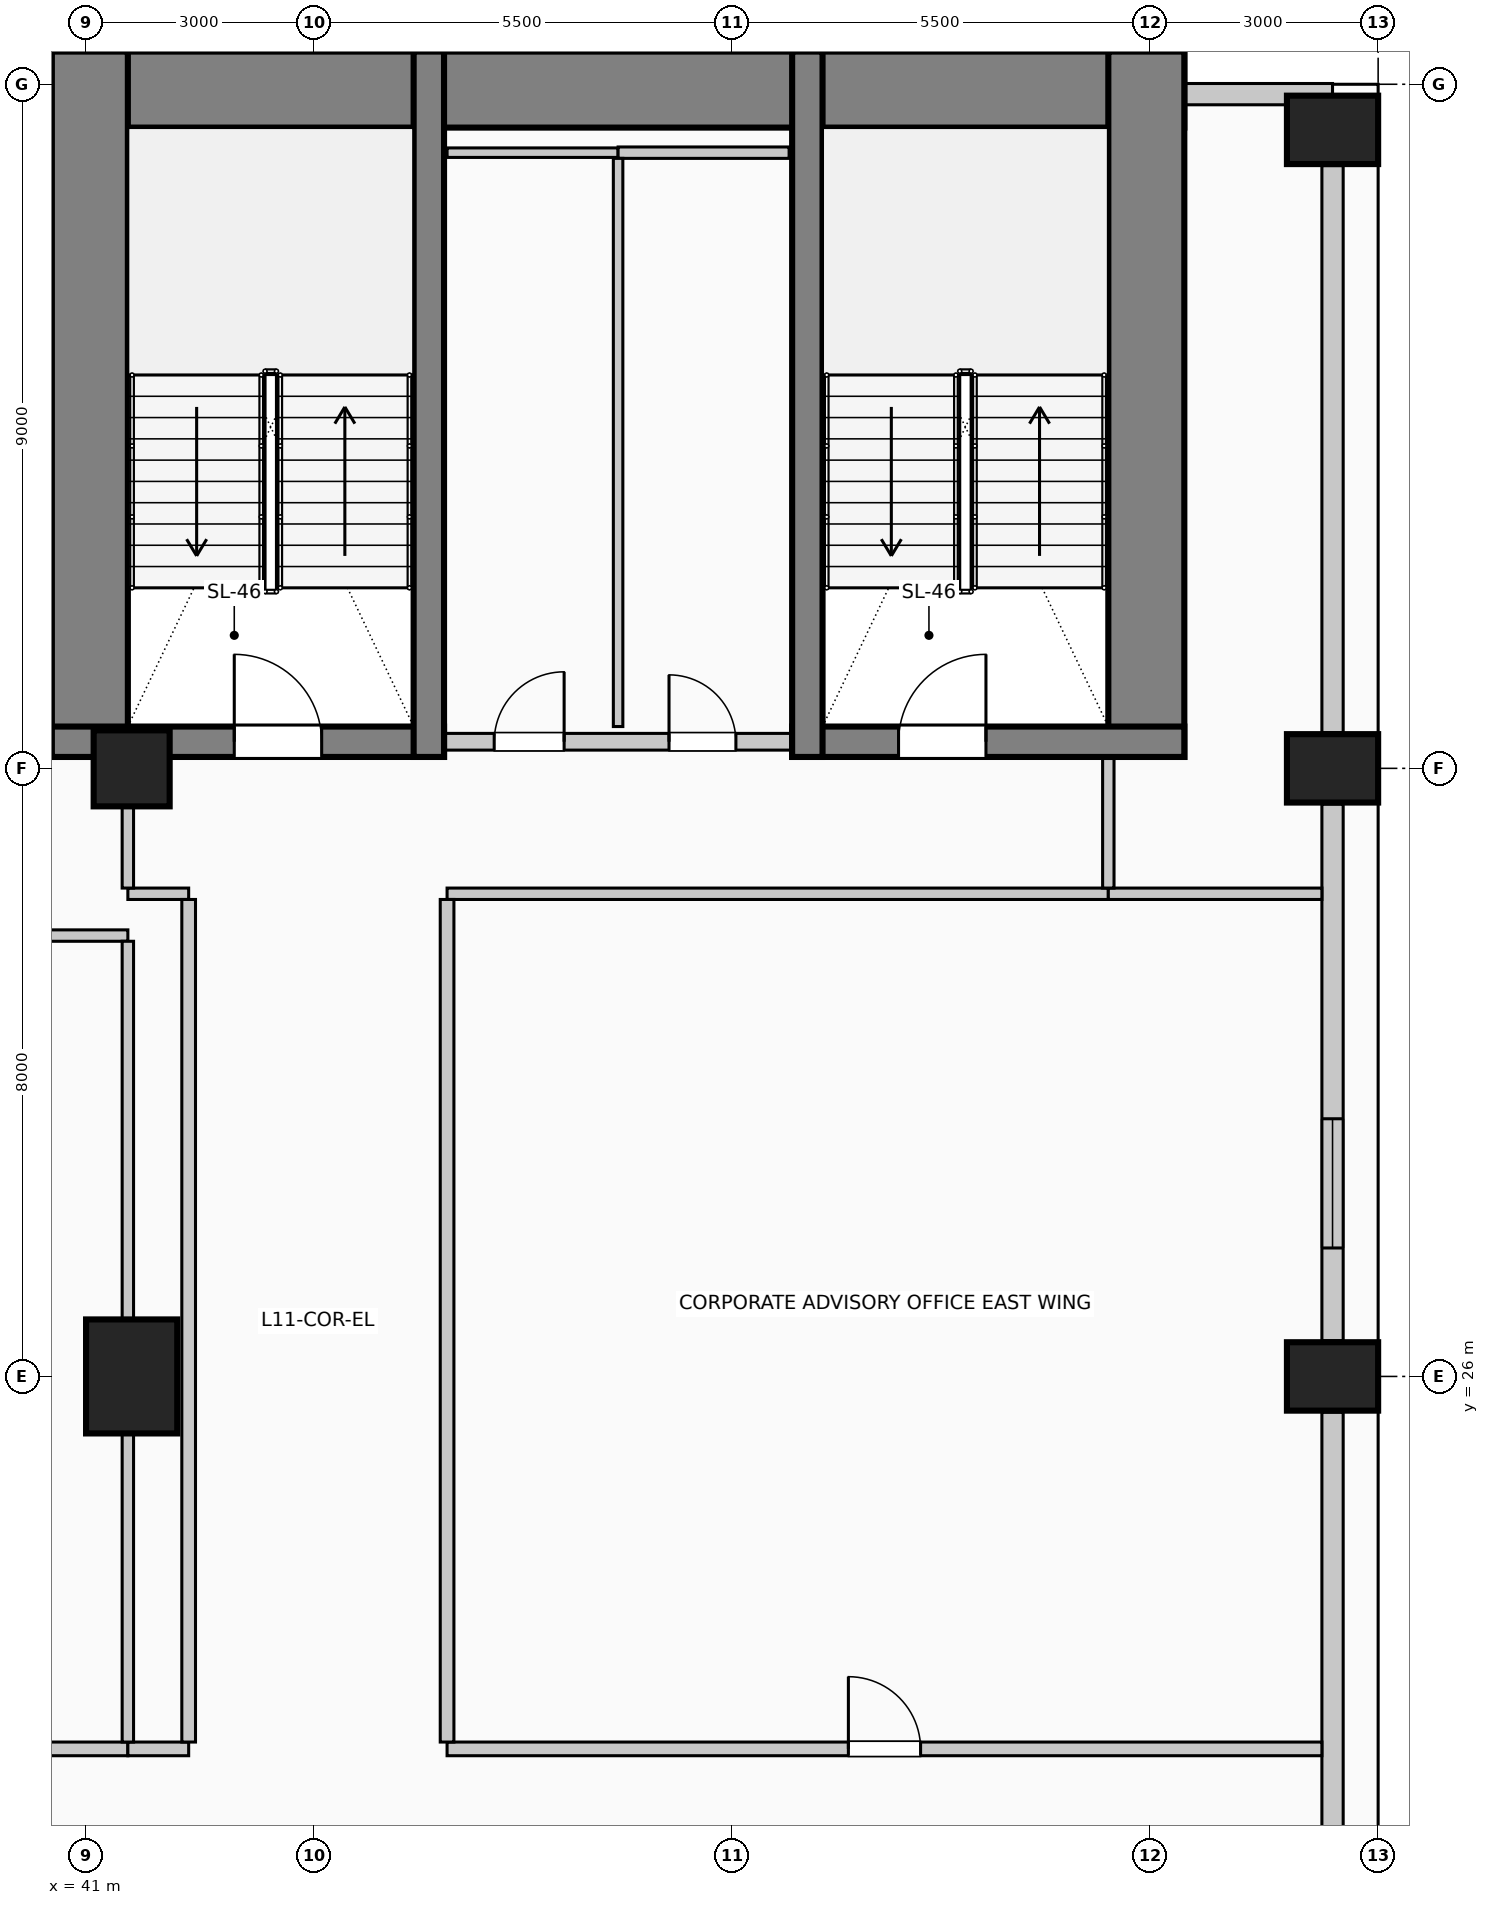
"""IFC4 building model, lengths in metres.
Left out: names, types, materials, properties, quantities, classifications, styles, units other than length and angle.
Written with IfcOpenShell. Run it as: python <this file> out.ifc"""

import sys

from ifc_helpers import new_model, si_unit, direction, frame, frame_2d, origin, origin_2d, place, context, subcontext, project, spatial, rectangle, circle, extrude, element, fill, save


model = new_model("IFC4")
c1 = context("Model", 3, precision=1e-05, world=origin(), true_north=direction((0.0, 1.0)))
c2 = subcontext(c1, "Body", "Model", "MODEL_VIEW")
j1 = project(units=[si_unit("LENGTHUNIT", "METRE"), si_unit("PLANEANGLEUNIT", "RADIAN")], contexts=[c1])
p1 = place(None, origin())
s1 = spatial("IfcSite", under=j1, at=p1, CompositionType="ELEMENT")
p2 = place(p1, origin())
s2 = spatial("IfcBuilding", under=s1, at=p2, CompositionType="ELEMENT")
p3 = place(p2, frame((0.0, 0.0, 46.6)))
s3 = spatial("IfcBuildingStorey", under=s2, at=p3, CompositionType="ELEMENT", Elevation=46.6)
p4 = place(p3, frame((40.55, 42.93, 0.0), z_axis=(0.0, 0.0, 1.0), x_axis=(1.0, 0.0, 0.0)))
e1 = element("IfcWall", 1, at=p4, inside=s3, PredefinedType="SHEAR", context=c2, shape_type="SweptSolid", body=[
    extrude(rectangle(XDim=14.9, YDim=1.0, at=frame_2d((7.45, 0.0))), origin(), (0.0, 0.0, 1.0), 4.0),
])
for number, where, z_axis, x_axis in (
    (2, (41.05, 34.15, 0.0), (0.0, 0.0, 1.0), (0.0, 1.0, 0.0)),
    (3, (54.95, 34.15, 0.0), (0.0, 0.0, 1.0), (0.0, 1.0, 0.0)),
):
    element("IfcWall", number, at=place(p3, frame(where, z_axis=z_axis, x_axis=x_axis)), inside=s3, PredefinedType="SHEAR", context=c2, shape_type="SweptSolid", body=[
        extrude(rectangle(XDim=9.28, YDim=1.0, at=frame_2d((4.64, 0.0))), origin(), (0.0, 0.0, 1.0), 4.0),
    ])
p5 = place(p3, frame((40.55, 34.35, 0.0), z_axis=(0.0, 0.0, 1.0), x_axis=(1.0, 0.0, 0.0)))
e4 = element("IfcWall", 4, at=p5, inside=s3, PredefinedType="SHEAR", context=c2, shape_type="SweptSolid", body=[
    extrude(rectangle(XDim=5.16, YDim=0.4, at=frame_2d((2.58, 0.0))), origin(), (0.0, 0.0, 1.0), 4.0),
])
p6 = place(p5, frame((2.4, 0.0, 0.0)))
e5 = element("IfcOpeningElement", 5, at=p6, cuts=e4, PredefinedType="OPENING", context=c2, shape_type="SweptSolid", body=[
    extrude(rectangle(XDim=1.15, YDim=2.2, at=frame_2d((0.575, 1.1))), frame((0.0, 0.21, 0.0), z_axis=(0.0, -1.0, 0.0), x_axis=(1.0, 0.0, 0.0)), (0.0, 0.0, 1.0), 0.42),
])
p7 = place(p3, frame((45.51, 34.15, 0.0), z_axis=(0.0, 0.0, 1.0), x_axis=(0.0, 1.0, 0.0)))
e6 = element("IfcWall", 6, at=p7, inside=s3, PredefinedType="SHEAR", context=c2, shape_type="SweptSolid", body=[
    extrude(rectangle(XDim=9.28, YDim=0.4, at=frame_2d((4.64, 0.0))), origin(), (0.0, 0.0, 1.0), 4.0),
])
p8 = place(p3, frame((50.29, 34.35, 0.0), z_axis=(0.0, 0.0, 1.0), x_axis=(1.0, 0.0, 0.0)))
e7 = element("IfcWall", 7, at=p8, inside=s3, PredefinedType="SHEAR", context=c2, shape_type="SweptSolid", body=[
    extrude(rectangle(XDim=5.16, YDim=0.4, at=frame_2d((2.58, 0.0))), origin(), (0.0, 0.0, 1.0), 4.0),
])
p9 = place(p8, frame((1.4, 0.0, 0.0)))
e8 = element("IfcOpeningElement", 8, at=p9, cuts=e7, PredefinedType="OPENING", context=c2, shape_type="SweptSolid", body=[
    extrude(rectangle(XDim=1.15, YDim=2.2, at=frame_2d((0.575, 1.1))), frame((0.0, 0.21, 0.0), z_axis=(0.0, -1.0, 0.0), x_axis=(1.0, 0.0, 0.0)), (0.0, 0.0, 1.0), 0.42),
])
p10 = place(p3, frame((50.49, 34.15, 0.0), z_axis=(0.0, 0.0, 1.0), x_axis=(0.0, 1.0, 0.0)))
e9 = element("IfcWall", 9, at=p10, inside=s3, PredefinedType="SHEAR", context=c2, shape_type="SweptSolid", body=[
    extrude(rectangle(XDim=9.28, YDim=0.4, at=frame_2d((4.64, 0.0))), origin(), (0.0, 0.0, 1.0), 4.0),
])
for number, where, z_axis, x_axis in (
    (10, (57.4, 26.0, 0.0), (0.0, 0.0, 1.0), (0.0, 1.0, 0.0)),
    (11, (57.4, 34.0, 0.0), (0.0, 0.0, 1.0), (0.0, 1.0, 0.0)),
    (12, (57.4, 42.4, 0.0), (0.0, 0.0, 1.0), (0.0, 1.0, 0.0)),
):
    element("IfcColumn", number, at=place(p3, frame(where, z_axis=z_axis, x_axis=x_axis)), inside=s3, PredefinedType="COLUMN", context=c2, shape_type="SweptSolid", body=[
        extrude(rectangle(XDim=0.9, YDim=1.2, at=origin_2d()), origin(), (0.0, 0.0, 1.0), 4.0),
    ])
p11 = place(p3, frame((41.6, 26.0, 0.0), z_axis=(0.0, 0.0, 1.0), x_axis=(1.0, 0.0, 0.0)))
e13 = element("IfcColumn", 13, at=p11, inside=s3, PredefinedType="COLUMN", context=c2, shape_type="SweptSolid", body=[
    extrude(rectangle(XDim=1.2, YDim=1.5, at=origin_2d()), origin(), (0.0, 0.0, 1.0), 4.0),
])
p12 = place(p3, frame((41.6, 34.0, 0.0), z_axis=(0.0, 0.0, 1.0), x_axis=(1.0, 0.0, 0.0)))
e14 = element("IfcColumn", 14, at=p12, inside=s3, PredefinedType="COLUMN", context=c2, shape_type="SweptSolid", body=[
    extrude(circle(Radius=0.5, at=origin_2d()), origin(), (0.0, 0.0, 1.0), 4.0),
])
p13 = place(p3, frame((57.4, 25.53, 0.0), z_axis=(0.0, 0.0, 1.0), x_axis=(0.0, -1.0, 0.0)))
e15 = element("IfcWall", 15, at=p13, inside=s3, PredefinedType="SOLIDWALL", context=c2, shape_type="SweptSolid", body=[
    extrude(rectangle(XDim=7.06, YDim=0.28, at=frame_2d((3.53, 0.0))), origin(), (0.0, 0.0, 1.0), 2.85),
])
p14 = place(p3, frame((57.4, 33.53, 0.0), z_axis=(0.0, 0.0, 1.0), x_axis=(0.0, -1.0, 0.0)))
e16 = element("IfcWall", 16, at=p14, inside=s3, PredefinedType="SOLIDWALL", context=c2, shape_type="SweptSolid", body=[
    extrude(rectangle(XDim=7.06, YDim=0.28, at=frame_2d((3.53, 0.0))), origin(), (0.0, 0.0, 1.0), 2.85),
])
p15 = place(p14, frame((4.14, 0.0, 0.5)))
e17 = element("IfcOpeningElement", 17, at=p15, cuts=e16, PredefinedType="OPENING", context=c2, shape_type="SweptSolid", body=[
    extrude(rectangle(XDim=1.7, YDim=1.95, at=frame_2d((0.85, 0.975))), frame((0.0, 0.15, 0.0), z_axis=(0.0, -1.0, 0.0), x_axis=(1.0, 0.0, 0.0)), (0.0, 0.0, 1.0), 0.3),
])
p16 = place(p3, frame((57.4, 41.93, 0.0), z_axis=(0.0, 0.0, 1.0), x_axis=(0.0, -1.0, 0.0)))
e18 = element("IfcWall", 18, at=p16, inside=s3, PredefinedType="SOLIDWALL", context=c2, shape_type="SweptSolid", body=[
    extrude(rectangle(XDim=7.46, YDim=0.28, at=frame_2d((3.73, 0.0))), origin(), (0.0, 0.0, 1.0), 2.85),
])
p17 = place(p3, frame((55.455, 42.87, 0.0), z_axis=(0.0, 0.0, 1.0), x_axis=(1.0, 0.0, 0.0)))
e19 = element("IfcWall", 19, at=p17, inside=s3, PredefinedType="SOLIDWALL", context=c2, shape_type="SweptSolid", body=[
    extrude(rectangle(XDim=1.945, YDim=0.28, at=frame_2d((0.972, 0.0))), origin(), (0.0, 0.0, 1.0), 3.7),
])
p18 = place(p3, frame((45.72, 34.35, 0.0), z_axis=(0.0, 0.0, 1.0), x_axis=(1.0, 0.0, 0.0)))
e20 = element("IfcWall", 20, at=p18, inside=s3, PredefinedType="PARTITIONING", context=c2, shape_type="SweptSolid", body=[
    extrude(rectangle(XDim=4.56, YDim=0.22, at=frame_2d((2.28, 0.0))), origin(), (0.0, 0.0, 1.0), 3.7),
])
p19 = place(p18, frame((0.65, 0.0, 0.0)))
e21 = element("IfcOpeningElement", 21, at=p19, cuts=e20, PredefinedType="OPENING", context=c2, shape_type="SweptSolid", body=[
    extrude(rectangle(XDim=0.92, YDim=2.1, at=frame_2d((0.46, 1.05))), frame((0.0, 0.12, 0.0), z_axis=(0.0, -1.0, 0.0), x_axis=(1.0, 0.0, 0.0)), (0.0, 0.0, 1.0), 0.24),
])
p20 = place(p18, frame((2.95, 0.0, 0.0)))
e22 = element("IfcOpeningElement", 22, at=p20, cuts=e20, PredefinedType="OPENING", context=c2, shape_type="SweptSolid", body=[
    extrude(rectangle(XDim=0.88, YDim=2.1, at=frame_2d((0.44, 1.05))), frame((0.0, 0.12, 0.0), z_axis=(0.0, -1.0, 0.0), x_axis=(1.0, 0.0, 0.0)), (0.0, 0.0, 1.0), 0.24),
])
p21 = place(p3, frame((20.3, 21.1, 0.0), z_axis=(0.0, 0.0, 1.0), x_axis=(1.0, 0.0, 0.0)))
e23 = element("IfcWall", 23, at=p21, inside=s3, PredefinedType="PARTITIONING", context=c2, shape_type="SweptSolid", body=[
    extrude(rectangle(XDim=21.25, YDim=0.18, at=frame_2d((10.625, 0.0))), origin(), (0.0, 0.0, 1.0), 3.7),
])
p22 = place(p21, frame((10.15, 0.0, 0.0)))
e24 = element("IfcOpeningElement", 24, at=p22, cuts=e23, PredefinedType="OPENING", context=c2, shape_type="SweptSolid", body=[
    extrude(rectangle(XDim=0.95, YDim=2.15, at=frame_2d((0.475, 1.075))), frame((0.0, 0.1, 0.0), z_axis=(0.0, -1.0, 0.0), x_axis=(1.0, 0.0, 0.0)), (0.0, 0.0, 1.0), 0.2),
])
p23 = place(p3, frame((41.55, 21.1, 0.0), z_axis=(0.0, 0.0, 1.0), x_axis=(1.0, 0.0, 0.0)))
e25 = element("IfcWall", 25, at=p23, inside=s3, PredefinedType="PARTITIONING", context=c2, shape_type="SweptSolid", body=[
    extrude(rectangle(XDim=0.8, YDim=0.18, at=frame_2d((0.4, 0.0))), origin(), (0.0, 0.0, 1.0), 3.7),
])
p24 = place(p3, frame((45.75, 21.1, 0.0), z_axis=(0.0, 0.0, 1.0), x_axis=(1.0, 0.0, 0.0)))
e26 = element("IfcWall", 26, at=p24, inside=s3, PredefinedType="PARTITIONING", context=c2, shape_type="SweptSolid", body=[
    extrude(rectangle(XDim=11.51, YDim=0.18, at=frame_2d((5.755, 0.0))), origin(), (0.0, 0.0, 1.0), 3.7),
])
p25 = place(p24, frame((5.28, 0.0, 0.0)))
e27 = element("IfcOpeningElement", 27, at=p25, cuts=e26, PredefinedType="OPENING", context=c2, shape_type="SweptSolid", body=[
    extrude(rectangle(XDim=0.95, YDim=2.15, at=frame_2d((0.475, 1.075))), frame((0.0, 0.1, 0.0), z_axis=(0.0, -1.0, 0.0), x_axis=(1.0, 0.0, 0.0)), (0.0, 0.0, 1.0), 0.2),
])
p26 = place(p3, frame((20.3, 31.8, 0.0), z_axis=(0.0, 0.0, 1.0), x_axis=(1.0, 0.0, 0.0)))
e28 = element("IfcWall", 28, at=p26, inside=s3, PredefinedType="PARTITIONING", context=c2, shape_type="SweptSolid", body=[
    extrude(rectangle(XDim=21.25, YDim=0.15, at=frame_2d((10.625, 0.0))), origin(), (0.0, 0.0, 1.0), 3.7),
])
p27 = place(p3, frame((41.55, 32.35, 0.0), z_axis=(0.0, 0.0, 1.0), x_axis=(1.0, 0.0, 0.0)))
e29 = element("IfcWall", 29, at=p27, inside=s3, PredefinedType="PARTITIONING", context=c2, shape_type="SweptSolid", body=[
    extrude(rectangle(XDim=0.8, YDim=0.15, at=frame_2d((0.4, 0.0))), origin(), (0.0, 0.0, 1.0), 3.7),
])
p28 = place(p3, frame((45.75, 32.35, 0.0), z_axis=(0.0, 0.0, 1.0), x_axis=(1.0, 0.0, 0.0)))
e30 = element("IfcWall", 30, at=p28, inside=s3, PredefinedType="PARTITIONING", context=c2, shape_type="SweptSolid", body=[
    extrude(rectangle(XDim=8.7, YDim=0.15, at=frame_2d((4.35, 0.0))), origin(), (0.0, 0.0, 1.0), 3.7),
])
p29 = place(p3, frame((54.45, 32.35, 0.0), z_axis=(0.0, 0.0, 1.0), x_axis=(1.0, 0.0, 0.0)))
e31 = element("IfcWall", 31, at=p29, inside=s3, PredefinedType="PARTITIONING", context=c2, shape_type="SweptSolid", body=[
    extrude(rectangle(XDim=2.81, YDim=0.15, at=frame_2d((1.405, 0.0))), origin(), (0.0, 0.0, 1.0), 3.7),
])
p30 = place(p3, frame((45.75, 42.1, 0.0), z_axis=(0.0, 0.0, 1.0), x_axis=(1.0, 0.0, 0.0)))
e32 = element("IfcWall", 32, at=p30, inside=s3, PredefinedType="PARTITIONING", context=c2, shape_type="SweptSolid", body=[
    extrude(rectangle(XDim=2.25, YDim=0.125, at=frame_2d((1.125, 0.0))), origin(), (0.0, 0.0, 1.0), 3.7),
])
p31 = place(p3, frame((48.0, 42.1, 0.0), z_axis=(0.0, 0.0, 1.0), x_axis=(1.0, 0.0, 0.0)))
e33 = element("IfcWall", 33, at=p31, inside=s3, PredefinedType="PARTITIONING", context=c2, shape_type="SweptSolid", body=[
    extrude(rectangle(XDim=2.25, YDim=0.15, at=frame_2d((1.125, 0.0))), origin(), (0.0, 0.0, 1.0), 3.7),
])
p32 = place(p3, frame((41.55, 21.19, 0.0), z_axis=(0.0, 0.0, 1.0), x_axis=(0.0, 1.0, 0.0)))
e34 = element("IfcWall", 34, at=p32, inside=s3, PredefinedType="PARTITIONING", context=c2, shape_type="SweptSolid", body=[
    extrude(rectangle(XDim=4.06, YDim=0.15, at=frame_2d((2.03, 0.0))), origin(), (0.0, 0.0, 1.0), 2.995),
])
p33 = place(p3, frame((41.55, 26.75, 0.0), z_axis=(0.0, 0.0, 1.0), x_axis=(0.0, 1.0, 0.0)))
e35 = element("IfcWall", 35, at=p33, inside=s3, PredefinedType="PARTITIONING", context=c2, shape_type="SweptSolid", body=[
    extrude(rectangle(XDim=4.975, YDim=0.15, at=frame_2d((2.488, 0.0))), origin(), (0.0, 0.0, 1.0), 2.995),
])
p34 = place(p3, frame((41.55, 32.425, 0.0), z_axis=(0.0, 0.0, 1.0), x_axis=(0.0, 1.0, 0.0)))
e36 = element("IfcWall", 36, at=p34, inside=s3, PredefinedType="PARTITIONING", context=c2, shape_type="SweptSolid", body=[
    extrude(rectangle(XDim=1.075, YDim=0.15, at=frame_2d((0.538, 0.0))), origin(), (0.0, 0.0, 1.0), 2.995),
])
p35 = place(p3, frame((41.55, 43.43, 0.0), z_axis=(0.0, 0.0, 1.0), x_axis=(0.0, 1.0, 0.0)))
e37 = element("IfcWall", 37, at=p35, inside=s3, PredefinedType="PARTITIONING", context=c2, shape_type="SweptSolid", body=[
    extrude(rectangle(XDim=1.22, YDim=0.15, at=frame_2d((0.61, 0.0))), origin(), (0.0, 0.0, 1.0), 3.7),
])
for number, where, z_axis, x_axis in (
    (38, (42.35, 21.19, 0.0), (0.0, 0.0, 1.0), (0.0, 1.0, 0.0)),
    (39, (45.75, 21.19, 0.0), (0.0, 0.0, 1.0), (0.0, 1.0, 0.0)),
):
    element("IfcWall", number, at=place(p3, frame(where, z_axis=z_axis, x_axis=x_axis)), inside=s3, PredefinedType="PARTITIONING", context=c2, shape_type="SweptSolid", body=[
        extrude(rectangle(XDim=11.085, YDim=0.18, at=frame_2d((5.542, 0.0))), origin(), (0.0, 0.0, 1.0), 3.7),
    ])
p36 = place(p3, frame((48.0, 34.55, 0.0), z_axis=(0.0, 0.0, 1.0), x_axis=(0.0, 1.0, 0.0)))
e40 = element("IfcWall", 40, at=p36, inside=s3, PredefinedType="PARTITIONING", context=c2, shape_type="SweptSolid", body=[
    extrude(rectangle(XDim=7.475, YDim=0.125, at=frame_2d((3.737, 0.0))), origin(), (0.0, 0.0, 1.0), 3.7),
])
p37 = place(p3, frame((54.45, 32.425, 0.0), z_axis=(0.0, 0.0, 1.0), x_axis=(0.0, 1.0, 0.0)))
e41 = element("IfcWall", 41, at=p37, inside=s3, PredefinedType="PARTITIONING", context=c2, shape_type="SweptSolid", body=[
    extrude(rectangle(XDim=1.725, YDim=0.15, at=frame_2d((0.862, 0.0))), origin(), (0.0, 0.0, 1.0), 3.7),
])
p38 = place(p15, origin())
e42 = element("IfcWindow", 42, at=p38, inside=s3, PartitioningType="SINGLE_PANEL", PredefinedType="WINDOW", context=c2, shape_type="SweptSolid", body=[
    extrude(rectangle(XDim=1.7, YDim=1.95, at=frame_2d((0.85, 0.975))), frame((0.0, 0.03, 0.0), z_axis=(0.0, -1.0, 0.0), x_axis=(1.0, 0.0, 0.0)), (0.0, 0.0, 1.0), 0.06),
])
fill(e17, e42)
p39 = place(p6, origin())
e43 = element("IfcDoor", 43, at=p39, inside=s3, OperationType="SINGLE_SWING_LEFT", PredefinedType="DOOR", context=c2, shape_type="SweptSolid", body=[
    extrude(rectangle(XDim=1.15, YDim=2.2, at=frame_2d((0.575, 1.1))), frame((0.0, 0.025, 0.0), z_axis=(0.0, -1.0, 0.0), x_axis=(1.0, 0.0, 0.0)), (0.0, 0.0, 1.0), 0.05),
])
fill(e5, e43)
p40 = place(p19, origin())
e44 = element("IfcDoor", 44, at=p40, inside=s3, OperationType="SINGLE_SWING_RIGHT", PredefinedType="DOOR", context=c2, shape_type="SweptSolid", body=[
    extrude(rectangle(XDim=0.92, YDim=2.1, at=frame_2d((0.46, 1.05))), frame((0.0, 0.025, 0.0), z_axis=(0.0, -1.0, 0.0), x_axis=(1.0, 0.0, 0.0)), (0.0, 0.0, 1.0), 0.05),
])
fill(e21, e44)
p41 = place(p20, origin())
e45 = element("IfcDoor", 45, at=p41, inside=s3, OperationType="SINGLE_SWING_LEFT", PredefinedType="DOOR", context=c2, shape_type="SweptSolid", body=[
    extrude(rectangle(XDim=0.88, YDim=2.1, at=frame_2d((0.44, 1.05))), frame((0.0, 0.025, 0.0), z_axis=(0.0, -1.0, 0.0), x_axis=(1.0, 0.0, 0.0)), (0.0, 0.0, 1.0), 0.05),
])
fill(e22, e45)
p42 = place(p9, origin())
e46 = element("IfcDoor", 46, at=p42, inside=s3, OperationType="SINGLE_SWING_RIGHT", PredefinedType="DOOR", context=c2, shape_type="SweptSolid", body=[
    extrude(rectangle(XDim=1.15, YDim=2.2, at=frame_2d((0.575, 1.1))), frame((0.0, 0.025, 0.0), z_axis=(0.0, -1.0, 0.0), x_axis=(1.0, 0.0, 0.0)), (0.0, 0.0, 1.0), 0.05),
])
fill(e8, e46)
p43 = place(p25, origin())
e47 = element("IfcDoor", 47, at=p43, inside=s3, OperationType="SINGLE_SWING_LEFT", PredefinedType="DOOR", context=c2, shape_type="SweptSolid", body=[
    extrude(rectangle(XDim=0.95, YDim=2.15, at=frame_2d((0.475, 1.075))), frame((0.0, 0.025, 0.0), z_axis=(0.0, -1.0, 0.0), x_axis=(1.0, 0.0, 0.0)), (0.0, 0.0, 1.0), 0.05),
])
fill(e27, e47)
save(model, sys.argv[1])
